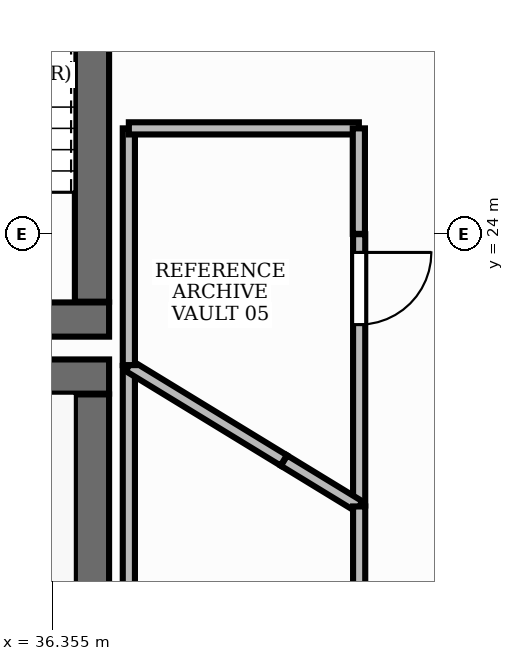
"""IFC4 building model, lengths in metres.
Left out: names, types, materials, properties, quantities, classifications, styles, units other than length and angle.
Written with IfcOpenShell. Run it as: python <this file> out.ifc"""

import sys

from ifc_helpers import new_model, si_unit, direction, frame, frame_2d, origin, place, context, subcontext, project, spatial, rectangle, extrude, element, fill, save


model = new_model("IFC4")
c1 = context("Model", 3, precision=1e-05, world=origin(), true_north=direction((0.0, 1.0)))
c2 = subcontext(c1, "Body", "Model", "MODEL_VIEW")
j1 = project(units=[si_unit("LENGTHUNIT", "METRE"), si_unit("PLANEANGLEUNIT", "RADIAN")], contexts=[c1])
p1 = place(None, origin())
s1 = spatial("IfcSite", under=j1, at=p1, CompositionType="ELEMENT")
p2 = place(p1, origin())
s2 = spatial("IfcBuilding", under=s1, at=p2, CompositionType="ELEMENT")
p3 = place(p2, frame((0.0, 0.0, 98.4)))
s3 = spatial("IfcBuildingStorey", under=s2, at=p3, CompositionType="ELEMENT", Elevation=98.4)
p4 = place(p3, frame((28.35, 22.125, 0.0), z_axis=(0.0, 0.0, 1.0), x_axis=(1.0, 0.0, 0.0)))
e1 = element("IfcWall", 1, at=p4, inside=s3, PredefinedType="SHEAR", context=c2, shape_type="SweptSolid", body=[
    extrude(rectangle(XDim=8.75, YDim=0.45, at=frame_2d((4.375, 0.0))), origin(), (0.0, 0.0, 1.0), 3.9),
])
p5 = place(p3, frame((36.875, 18.81, 0.0), z_axis=(0.0, 0.0, 1.0), x_axis=(0.0, 1.0, 0.0)))
e2 = element("IfcWall", 2, at=p5, inside=s3, PredefinedType="SHEAR", context=c2, shape_type="SweptSolid", body=[
    extrude(rectangle(XDim=3.08, YDim=0.45, at=frame_2d((1.54, 0.0))), origin(), (0.0, 0.0, 1.0), 3.9),
])
p6 = place(p3, frame((33.1, 22.875, 0.0), z_axis=(0.0, 0.0, 1.0), x_axis=(1.0, 0.0, 0.0)))
e3 = element("IfcWall", 3, at=p6, inside=s3, PredefinedType="SHEAR", context=c2, shape_type="SweptSolid", body=[
    extrude(rectangle(XDim=4.0, YDim=0.45, at=frame_2d((2.0, 0.0))), origin(), (0.0, 0.0, 1.0), 3.9),
])
p7 = place(p3, frame((36.875, 23.11, 0.0), z_axis=(0.0, 0.0, 1.0), x_axis=(0.0, 1.0, 0.0)))
e4 = element("IfcWall", 4, at=p7, inside=s3, PredefinedType="SHEAR", context=c2, shape_type="SweptSolid", body=[
    extrude(rectangle(XDim=7.78, YDim=0.45, at=frame_2d((3.89, 0.0))), origin(), (0.0, 0.0, 1.0), 3.9),
])
p8 = place(p3, frame((40.39, 23.998, 0.0), z_axis=(0.0, 0.0, 1.0), x_axis=(0.0, -1.0, 0.0)))
e5 = element("IfcWall", 5, at=p8, inside=s3, PredefinedType="PARTITIONING", context=c2, shape_type="SweptSolid", body=[
    extrude(rectangle(XDim=3.57, YDim=0.16, at=frame_2d((1.785, 0.0))), origin(), (0.0, 0.0, 1.0), 2.91),
])
p9 = place(p8, frame((0.24, 0.0, 0.0)))
e6 = element("IfcOpeningElement", 6, at=p9, cuts=e5, PredefinedType="OPENING", context=c2, shape_type="SweptSolid", body=[
    extrude(rectangle(XDim=0.95, YDim=2.15, at=frame_2d((0.475, 1.075))), frame((0.0, 0.095, 0.0), z_axis=(0.0, -1.0, 0.0), x_axis=(1.0, 0.0, 0.0)), (0.0, 0.0, 1.0), 0.19),
])
p10 = place(p3, frame((39.402, 21.019, 0.0), z_axis=(0.0, 0.0, 1.0), x_axis=(0.853521615148, -0.52105743683, 0.0)))
e7 = element("IfcWall", 7, at=p10, inside=s3, PredefinedType="PARTITIONING", context=c2, shape_type="SweptSolid", body=[
    extrude(rectangle(XDim=1.157, YDim=0.16, at=frame_2d((0.579, 0.0))), origin(), (0.0, 0.0, 1.0), 2.91),
])
p11 = place(p3, frame((40.39, 20.416, 0.0), z_axis=(0.0, 0.0, 1.0), x_axis=(0.0, -1.0, 0.0)))
e8 = element("IfcWall", 8, at=p11, inside=s3, PredefinedType="PARTITIONING", context=c2, shape_type="SweptSolid", body=[
    extrude(rectangle(XDim=3.916, YDim=0.16, at=frame_2d((1.958, 0.0))), origin(), (0.0, 0.0, 1.0), 2.91),
])
p12 = place(p3, frame((37.36, 18.1, 0.0), z_axis=(0.0, 0.0, 1.0), x_axis=(0.0, 1.0, 0.0)))
e9 = element("IfcWall", 9, at=p12, inside=s3, PredefinedType="PARTITIONING", context=c2, shape_type="SweptSolid", body=[
    extrude(rectangle(XDim=4.166, YDim=0.16, at=frame_2d((2.083, 0.0))), origin(), (0.0, 0.0, 1.0), 2.91),
])
p13 = place(p3, frame((37.36, 22.266, 0.0), z_axis=(0.0, 0.0, 1.0), x_axis=(0.85352442543, -0.521052833401, 0.0)))
e10 = element("IfcWall", 10, at=p13, inside=s3, PredefinedType="PARTITIONING", context=c2, shape_type="SweptSolid", body=[
    extrude(rectangle(XDim=2.387, YDim=0.16, at=frame_2d((1.194, 0.0))), origin(), (0.0, 0.0, 1.0), 2.91),
])
p14 = place(p3, frame((37.36, 22.276, 0.0), z_axis=(0.0, 0.0, 1.0), x_axis=(0.0, 1.0, 0.0)))
e11 = element("IfcWall", 11, at=p14, inside=s3, PredefinedType="PARTITIONING", context=c2, shape_type="SweptSolid", body=[
    extrude(rectangle(XDim=3.114, YDim=0.16, at=frame_2d((1.557, 0.0))), origin(), (0.0, 0.0, 1.0), 2.91),
])
p15 = place(p3, frame((37.36, 25.39, 0.0), z_axis=(0.0, 0.0, 1.0), x_axis=(1.0, 0.0, 0.0)))
e12 = element("IfcWall", 12, at=p15, inside=s3, PredefinedType="PARTITIONING", context=c2, shape_type="SweptSolid", body=[
    extrude(rectangle(XDim=3.026, YDim=0.16, at=frame_2d((1.513, 0.0))), origin(), (0.0, 0.0, 1.0), 2.91),
])
p16 = place(p3, frame((40.386, 25.39, 0.0), z_axis=(0.0, 0.0, 1.0), x_axis=(0.0, -1.0, 0.0)))
e13 = element("IfcWall", 13, at=p16, inside=s3, PredefinedType="PARTITIONING", context=c2, shape_type="SweptSolid", body=[
    extrude(rectangle(XDim=1.388, YDim=0.16, at=frame_2d((0.694, 0.0))), origin(), (0.0, 0.0, 1.0), 2.91),
])
p17 = place(p9, origin())
e14 = element("IfcDoor", 14, at=p17, inside=s3, OperationType="SINGLE_SWING_LEFT", PredefinedType="DOOR", context=c2, shape_type="SweptSolid", body=[
    extrude(rectangle(XDim=0.95, YDim=2.15, at=frame_2d((0.475, 1.075))), frame((0.0, 0.025, 0.0), z_axis=(0.0, -1.0, 0.0), x_axis=(1.0, 0.0, 0.0)), (0.0, 0.0, 1.0), 0.05),
])
fill(e6, e14)
save(model, sys.argv[1])
